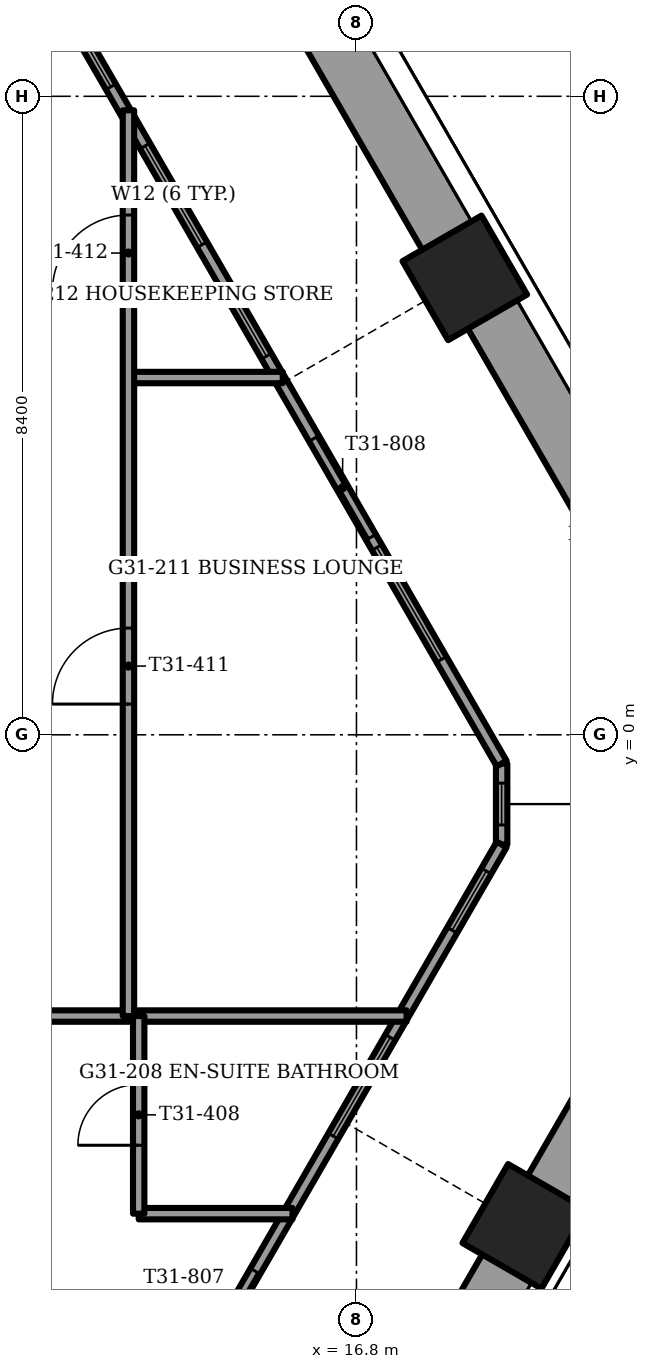
"""IFC4 building model, lengths in metres.
Left out: names, types, materials, properties, quantities, classifications, styles, units other than length and angle.
Written with IfcOpenShell. Run it as: python <this file> out.ifc"""

import sys

from ifc_helpers import new_model, si_unit, direction, frame, frame_2d, origin, origin_2d, place, context, subcontext, project, spatial, rectangle, extrude, element, fill, save


model = new_model("IFC4")
c1 = context("Model", 3, precision=1e-05, world=origin(), true_north=direction((0.0, 1.0)))
c2 = subcontext(c1, "Body", "Model", "MODEL_VIEW")
j1 = project(units=[si_unit("LENGTHUNIT", "METRE"), si_unit("PLANEANGLEUNIT", "RADIAN")], contexts=[c1])
p1 = place(None, origin())
s1 = spatial("IfcSite", under=j1, at=p1, CompositionType="ELEMENT")
p2 = place(p1, origin())
s2 = spatial("IfcBuilding", under=s1, at=p2, CompositionType="ELEMENT")
p3 = place(p2, frame((0.0, 0.0, 127.25)))
s3 = spatial("IfcBuildingStorey", under=s2, at=p3, CompositionType="ELEMENT", Elevation=127.25)
for number, where, z_axis, x_axis in (
    (1, (19.014, -6.467, -1.2), (0.0, 0.0, 1.0), (-0.5, -0.866, 0.0)),
    (2, (18.225, 6.011, -1.2), (0.0, 0.0, 1.0), (0.5, -0.866, 0.0)),
):
    element("IfcColumn", number, at=place(p3, frame(where, z_axis=z_axis, x_axis=x_axis)), inside=s3, PredefinedType="COLUMN", context=c2, shape_type="SweptSolid", body=[
        extrude(rectangle(XDim=1.2, YDim=1.2, at=origin_2d()), origin(), (0.0, 0.0, 1.0), 3.75),
    ])
p4 = place(p3, frame((15.522, -12.815, 0.0), z_axis=(0.0, 0.0, 1.0), x_axis=(0.499999023957, 0.866025967302, 0.0)))
e3 = element("IfcWall", 3, at=p4, inside=s3, PredefinedType="PARAPET", context=c2, shape_type="SweptSolid", body=[
    extrude(rectangle(XDim=6.673, YDim=0.9, at=frame_2d((3.337, 0.0))), origin(), (0.0, 0.0, 1.0), 1.1),
])
p5 = place(p3, frame((19.429, -6.048, 0.0), z_axis=(0.0, 0.0, 1.0), x_axis=(0.499982573574, 0.866035464703, 0.0)))
e4 = element("IfcWall", 4, at=p5, inside=s3, PredefinedType="PARAPET", context=c2, shape_type="SweptSolid", body=[
    extrude(rectangle(XDim=5.281, YDim=0.9, at=frame_2d((2.641, 0.0))), origin(), (0.0, 0.0, 1.0), 1.1),
])
p6 = place(p3, frame((22.069, -0.347, 0.0), z_axis=(0.0, 0.0, 1.0), x_axis=(-0.500001814021, 0.866024356456, 0.0)))
e5 = element("IfcWall", 5, at=p6, inside=s3, PredefinedType="PARAPET", context=c2, shape_type="SweptSolid", body=[
    extrude(rectangle(XDim=6.859, YDim=0.9, at=frame_2d((3.429, 0.0))), origin(), (0.0, 0.0, 1.0), 1.1),
])
p7 = place(p3, frame((18.07, 6.58, 0.0), z_axis=(0.0, 0.0, 1.0), x_axis=(-0.499999023957, 0.866025967302, 0.0)))
e6 = element("IfcWall", 6, at=p7, inside=s3, PredefinedType="PARAPET", context=c2, shape_type="SweptSolid", body=[
    extrude(rectangle(XDim=6.673, YDim=0.9, at=frame_2d((3.337, 0.0))), origin(), (0.0, 0.0, 1.0), 1.1),
])
p8 = place(p3, frame((10.605, -15.481, 0.0), z_axis=(0.0, 0.0, 1.0), x_axis=(0.500010582961, 0.866019293623, 0.0)))
e7 = element("IfcWall", 7, at=p8, inside=s3, PredefinedType="SOLIDWALL", context=c2, shape_type="SweptSolid", body=[
    extrude(rectangle(XDim=16.21, YDim=0.15, at=frame_2d((8.105, 0.0))), origin(), (0.0, 0.0, 1.0), 3.45),
])
p9 = place(p8, frame((2.105, 0.0, 0.15)))
e8 = element("IfcOpeningElement", 8, at=p9, cuts=e7, PredefinedType="OPENING", context=c2, shape_type="SweptSolid", body=[
    extrude(rectangle(XDim=1.7, YDim=2.85, at=frame_2d((0.85, 1.425))), frame((0.0, 0.075, 0.0), z_axis=(0.0, -1.0, 0.0), x_axis=(1.0, 0.0, 0.0)), (0.0, 0.0, 1.0), 0.15),
])
p10 = place(p8, frame((4.205, 0.0, 0.0)))
e9 = element("IfcOpeningElement", 9, at=p10, cuts=e7, PredefinedType="OPENING", context=c2, shape_type="SweptSolid", body=[
    extrude(rectangle(XDim=1.5, YDim=2.4, at=frame_2d((0.75, 1.2))), frame((0.0, 0.075, 0.0), z_axis=(0.0, -1.0, 0.0), x_axis=(1.0, 0.0, 0.0)), (0.0, 0.0, 1.0), 0.15),
])
p11 = place(p8, frame((6.305, 0.0, 0.15)))
e10 = element("IfcOpeningElement", 10, at=p11, cuts=e7, PredefinedType="OPENING", context=c2, shape_type="SweptSolid", body=[
    extrude(rectangle(XDim=1.7, YDim=2.85, at=frame_2d((0.85, 1.425))), frame((0.0, 0.075, 0.0), z_axis=(0.0, -1.0, 0.0), x_axis=(1.0, 0.0, 0.0)), (0.0, 0.0, 1.0), 0.15),
])
p12 = place(p8, frame((8.228, 0.0, 0.0)))
e11 = element("IfcOpeningElement", 11, at=p12, cuts=e7, PredefinedType="OPENING", context=c2, shape_type="SweptSolid", body=[
    extrude(rectangle(XDim=1.5, YDim=2.4, at=frame_2d((0.75, 1.2))), frame((0.0, 0.075, 0.0), z_axis=(0.0, -1.0, 0.0), x_axis=(1.0, 0.0, 0.0)), (0.0, 0.0, 1.0), 0.15),
])
p13 = place(p8, frame((11.78, 0.0, 0.15)))
e12 = element("IfcOpeningElement", 12, at=p13, cuts=e7, PredefinedType="OPENING", context=c2, shape_type="SweptSolid", body=[
    extrude(rectangle(XDim=1.5, YDim=2.85, at=frame_2d((0.75, 1.425))), frame((0.0, 0.075, 0.0), z_axis=(0.0, -1.0, 0.0), x_axis=(1.0, 0.0, 0.0)), (0.0, 0.0, 1.0), 0.15),
])
p14 = place(p8, frame((0.402, 0.0, 0.15)))
e13 = element("IfcOpeningElement", 13, at=p14, cuts=e7, PredefinedType="OPENING", context=c2, shape_type="SweptSolid", body=[
    extrude(rectangle(XDim=0.9, YDim=2.73, at=frame_2d((0.45, 1.365))), frame((0.0, 0.075, 0.0), z_axis=(0.0, -1.0, 0.0), x_axis=(1.0, 0.0, 0.0)), (0.0, 0.0, 1.0), 0.15),
])
p15 = place(p8, frame((14.907, 0.0, 0.15)))
e14 = element("IfcOpeningElement", 14, at=p15, cuts=e7, PredefinedType="OPENING", context=c2, shape_type="SweptSolid", body=[
    extrude(rectangle(XDim=0.9, YDim=2.73, at=frame_2d((0.45, 1.365))), frame((0.0, 0.075, 0.0), z_axis=(0.0, -1.0, 0.0), x_axis=(1.0, 0.0, 0.0)), (0.0, 0.0, 1.0), 0.15),
])
p16 = place(p3, frame((18.71, -0.378, 0.0), z_axis=(0.0, 0.0, 1.0), x_axis=(-0.500001219746, 0.866024699562, 0.0)))
e15 = element("IfcWall", 15, at=p16, inside=s3, PredefinedType="SOLIDWALL", context=c2, shape_type="SweptSolid", body=[
    extrude(rectangle(XDim=22.137, YDim=0.15, at=frame_2d((11.068, 0.0))), origin(), (0.0, 0.0, 1.0), 3.45),
])
p17 = place(p16, frame((1.583, 0.0, 0.15)))
e16 = element("IfcOpeningElement", 16, at=p17, cuts=e15, PredefinedType="OPENING", context=c2, shape_type="SweptSolid", body=[
    extrude(rectangle(XDim=1.7, YDim=2.85, at=frame_2d((0.85, 1.425))), frame((0.0, 0.075, 0.0), z_axis=(0.0, -1.0, 0.0), x_axis=(1.0, 0.0, 0.0)), (0.0, 0.0, 1.0), 0.15),
])
p18 = place(p16, frame((3.438, 0.0, 0.0)))
e17 = element("IfcOpeningElement", 17, at=p18, cuts=e15, PredefinedType="OPENING", context=c2, shape_type="SweptSolid", body=[
    extrude(rectangle(XDim=1.5, YDim=2.4, at=frame_2d((0.75, 1.2))), frame((0.0, 0.075, 0.0), z_axis=(0.0, -1.0, 0.0), x_axis=(1.0, 0.0, 0.0)), (0.0, 0.0, 1.0), 0.15),
])
p19 = place(p16, frame((6.188, 0.0, 0.15)))
e18 = element("IfcOpeningElement", 18, at=p19, cuts=e15, PredefinedType="OPENING", context=c2, shape_type="SweptSolid", body=[
    extrude(rectangle(XDim=0.9, YDim=2.85, at=frame_2d((0.45, 1.425))), frame((0.0, 0.075, 0.0), z_axis=(0.0, -1.0, 0.0), x_axis=(1.0, 0.0, 0.0)), (0.0, 0.0, 1.0), 0.15),
])
p20 = place(p16, frame((7.883, 0.0, 0.15)))
e19 = element("IfcOpeningElement", 19, at=p20, cuts=e15, PredefinedType="OPENING", context=c2, shape_type="SweptSolid", body=[
    extrude(rectangle(XDim=1.5, YDim=2.85, at=frame_2d((0.75, 1.425))), frame((0.0, 0.075, 0.0), z_axis=(0.0, -1.0, 0.0), x_axis=(1.0, 0.0, 0.0)), (0.0, 0.0, 1.0), 0.15),
])
p21 = place(p16, frame((12.481, 0.0, 0.15)))
e20 = element("IfcOpeningElement", 20, at=p21, cuts=e15, PredefinedType="OPENING", context=c2, shape_type="SweptSolid", body=[
    extrude(rectangle(XDim=0.9, YDim=2.85, at=frame_2d((0.45, 1.425))), frame((0.0, 0.075, 0.0), z_axis=(0.0, -1.0, 0.0), x_axis=(1.0, 0.0, 0.0)), (0.0, 0.0, 1.0), 0.15),
])
p22 = place(p16, frame((10.281, 0.0, 0.15)))
e21 = element("IfcOpeningElement", 21, at=p22, cuts=e15, PredefinedType="OPENING", context=c2, shape_type="SweptSolid", body=[
    extrude(rectangle(XDim=1.5, YDim=2.85, at=frame_2d((0.75, 1.425))), frame((0.0, 0.075, 0.0), z_axis=(0.0, -1.0, 0.0), x_axis=(1.0, 0.0, 0.0)), (0.0, 0.0, 1.0), 0.15),
])
p23 = place(p16, frame((16.465, 0.0, 0.15)))
e22 = element("IfcOpeningElement", 22, at=p23, cuts=e15, PredefinedType="OPENING", context=c2, shape_type="SweptSolid", body=[
    extrude(rectangle(XDim=0.9, YDim=2.85, at=frame_2d((0.45, 1.425))), frame((0.0, 0.075, 0.0), z_axis=(0.0, -1.0, 0.0), x_axis=(1.0, 0.0, 0.0)), (0.0, 0.0, 1.0), 0.15),
])
p24 = place(p16, frame((14.265, 0.0, 0.15)))
e23 = element("IfcOpeningElement", 23, at=p24, cuts=e15, PredefinedType="OPENING", context=c2, shape_type="SweptSolid", body=[
    extrude(rectangle(XDim=1.5, YDim=2.85, at=frame_2d((0.75, 1.425))), frame((0.0, 0.075, 0.0), z_axis=(0.0, -1.0, 0.0), x_axis=(1.0, 0.0, 0.0)), (0.0, 0.0, 1.0), 0.15),
])
p25 = place(p16, frame((19.415, 0.0, 0.15)))
e24 = element("IfcOpeningElement", 24, at=p25, cuts=e15, PredefinedType="OPENING", context=c2, shape_type="SweptSolid", body=[
    extrude(rectangle(XDim=1.7, YDim=2.73, at=frame_2d((0.85, 1.365))), frame((0.0, 0.075, 0.0), z_axis=(0.0, -1.0, 0.0), x_axis=(1.0, 0.0, 0.0)), (0.0, 0.0, 1.0), 0.15),
])
p26 = place(p3, frame((18.71, -1.444, 0.0), z_axis=(0.0, 0.0, 1.0), x_axis=(0.0, 1.0, 0.0)))
e25 = element("IfcWall", 25, at=p26, inside=s3, PredefinedType="SOLIDWALL", context=c2, shape_type="SweptSolid", body=[
    extrude(rectangle(XDim=1.065, YDim=0.15, at=frame_2d((0.533, 0.0))), origin(), (0.0, 0.0, 1.0), 3.45),
])
p27 = place(p26, frame((0.258, 0.0, 0.15)))
e26 = element("IfcOpeningElement", 26, at=p27, cuts=e25, PredefinedType="OPENING", context=c2, shape_type="SweptSolid", body=[
    extrude(rectangle(XDim=0.55, YDim=2.85, at=frame_2d((0.275, 1.425))), frame((0.0, 0.075, 0.0), z_axis=(0.0, -1.0, 0.0), x_axis=(1.0, 0.0, 0.0)), (0.0, 0.0, 1.0), 0.15),
])
p28 = place(p3, frame((13.935, -6.3, 0.0), z_axis=(0.0, 0.0, 1.0), x_axis=(1.0, 0.0, 0.0)))
e27 = element("IfcWall", 27, at=p28, inside=s3, PredefinedType="PARTITIONING", context=c2, shape_type="SweptSolid", body=[
    extrude(rectangle(XDim=2.023, YDim=0.15, at=frame_2d((1.011, 0.0))), origin(), (0.0, 0.0, 1.0), 3.45),
])
p29 = place(p3, frame((9.16, -3.7, 0.0), z_axis=(0.0, 0.0, 1.0), x_axis=(1.0, 0.0, 0.0)))
e28 = element("IfcWall", 28, at=p29, inside=s3, PredefinedType="PARTITIONING", context=c2, shape_type="SweptSolid", body=[
    extrude(rectangle(XDim=8.299, YDim=0.15, at=frame_2d((4.149, 0.0))), origin(), (0.0, 0.0, 1.0), 3.45),
])
p30 = place(p29, frame((0.24, 0.0, 0.0)))
e29 = element("IfcOpeningElement", 29, at=p30, cuts=e28, PredefinedType="OPENING", context=c2, shape_type="SweptSolid", body=[
    extrude(rectangle(XDim=1.0, YDim=2.1, at=frame_2d((0.5, 1.05))), frame((0.0, 0.075, 0.0), z_axis=(0.0, -1.0, 0.0), x_axis=(1.0, 0.0, 0.0)), (0.0, 0.0, 1.0), 0.15),
])
p31 = place(p3, frame((13.8, 4.7, 0.0), z_axis=(0.0, 0.0, 1.0), x_axis=(1.0, 0.0, 0.0)))
e30 = element("IfcWall", 30, at=p31, inside=s3, PredefinedType="PARTITIONING", context=c2, shape_type="SweptSolid", body=[
    extrude(rectangle(XDim=2.03, YDim=0.15, at=frame_2d((1.015, 0.0))), origin(), (0.0, 0.0, 1.0), 3.45),
])
p32 = place(p3, frame((13.935, -6.3, 0.0), z_axis=(0.0, 0.0, 1.0), x_axis=(0.0, 1.0, 0.0)))
e31 = element("IfcWall", 31, at=p32, inside=s3, PredefinedType="PARTITIONING", context=c2, shape_type="SweptSolid", body=[
    extrude(rectangle(XDim=2.6, YDim=0.15, at=frame_2d((1.3, 0.0))), origin(), (0.0, 0.0, 1.0), 3.45),
])
p33 = place(p32, frame((0.9, 0.0, 0.0)))
e32 = element("IfcOpeningElement", 32, at=p33, cuts=e31, PredefinedType="OPENING", context=c2, shape_type="SweptSolid", body=[
    extrude(rectangle(XDim=0.8, YDim=2.1, at=frame_2d((0.4, 1.05))), frame((0.0, 0.075, 0.0), z_axis=(0.0, -1.0, 0.0), x_axis=(1.0, 0.0, 0.0)), (0.0, 0.0, 1.0), 0.15),
])
p34 = place(p3, frame((13.8, -3.7, 0.0), z_axis=(0.0, 0.0, 1.0), x_axis=(0.0, 1.0, 0.0)))
e33 = element("IfcWall", 33, at=p34, inside=s3, PredefinedType="PARTITIONING", context=c2, shape_type="SweptSolid", body=[
    extrude(rectangle(XDim=11.916, YDim=0.15, at=frame_2d((5.958, 0.0))), origin(), (0.0, 0.0, 1.0), 3.45),
])
p35 = place(p34, frame((4.104, 0.0, 0.0)))
e34 = element("IfcOpeningElement", 34, at=p35, cuts=e33, PredefinedType="OPENING", context=c2, shape_type="SweptSolid", body=[
    extrude(rectangle(XDim=1.0, YDim=2.1, at=frame_2d((0.5, 1.05))), frame((0.0, 0.075, 0.0), z_axis=(0.0, -1.0, 0.0), x_axis=(1.0, 0.0, 0.0)), (0.0, 0.0, 1.0), 0.15),
])
p36 = place(p34, frame((9.538, 0.0, 0.0)))
e35 = element("IfcOpeningElement", 35, at=p36, cuts=e33, PredefinedType="OPENING", context=c2, shape_type="SweptSolid", body=[
    extrude(rectangle(XDim=1.0, YDim=2.1, at=frame_2d((0.5, 1.05))), frame((0.0, 0.075, 0.0), z_axis=(0.0, -1.0, 0.0), x_axis=(1.0, 0.0, 0.0)), (0.0, 0.0, 1.0), 0.15),
])
p37 = place(p12, origin())
e36 = element("IfcDoor", 36, at=p37, inside=s3, OperationType="SLIDING_TO_RIGHT", PredefinedType="DOOR", context=c2, shape_type="SweptSolid", body=[
    extrude(rectangle(XDim=1.5, YDim=2.4, at=frame_2d((0.75, 1.2))), frame((0.0, 0.025, 0.0), z_axis=(0.0, -1.0, 0.0), x_axis=(1.0, 0.0, 0.0)), (0.0, 0.0, 1.0), 0.05),
])
fill(e11, e36)
p38 = place(p13, origin())
e37 = element("IfcWindow", 37, at=p38, inside=s3, PartitioningType="SINGLE_PANEL", PredefinedType="WINDOW", context=c2, shape_type="SweptSolid", body=[
    extrude(rectangle(XDim=1.5, YDim=2.85, at=frame_2d((0.75, 1.425))), frame((0.0, 0.03, 0.0), z_axis=(0.0, -1.0, 0.0), x_axis=(1.0, 0.0, 0.0)), (0.0, 0.0, 1.0), 0.06),
])
fill(e12, e37)
p39 = place(p15, origin())
e38 = element("IfcWindow", 38, at=p39, inside=s3, PartitioningType="SINGLE_PANEL", PredefinedType="WINDOW", context=c2, shape_type="SweptSolid", body=[
    extrude(rectangle(XDim=0.9, YDim=2.73, at=frame_2d((0.45, 1.365))), frame((0.0, 0.03, 0.0), z_axis=(0.0, -1.0, 0.0), x_axis=(1.0, 0.0, 0.0)), (0.0, 0.0, 1.0), 0.06),
])
fill(e14, e38)
p40 = place(p17, origin())
e39 = element("IfcWindow", 39, at=p40, inside=s3, PartitioningType="SINGLE_PANEL", PredefinedType="WINDOW", context=c2, shape_type="SweptSolid", body=[
    extrude(rectangle(XDim=1.7, YDim=2.85, at=frame_2d((0.85, 1.425))), frame((0.0, 0.03, 0.0), z_axis=(0.0, -1.0, 0.0), x_axis=(1.0, 0.0, 0.0)), (0.0, 0.0, 1.0), 0.06),
])
fill(e16, e39)
p41 = place(p18, origin())
e40 = element("IfcDoor", 40, at=p41, inside=s3, OperationType="SLIDING_TO_LEFT", PredefinedType="DOOR", context=c2, shape_type="SweptSolid", body=[
    extrude(rectangle(XDim=1.5, YDim=2.4, at=frame_2d((0.75, 1.2))), frame((0.0, 0.025, 0.0), z_axis=(0.0, -1.0, 0.0), x_axis=(1.0, 0.0, 0.0)), (0.0, 0.0, 1.0), 0.05),
])
fill(e17, e40)
p42 = place(p19, origin())
e41 = element("IfcWindow", 41, at=p42, inside=s3, PartitioningType="SINGLE_PANEL", PredefinedType="WINDOW", context=c2, shape_type="SweptSolid", body=[
    extrude(rectangle(XDim=0.9, YDim=2.85, at=frame_2d((0.45, 1.425))), frame((0.0, 0.03, 0.0), z_axis=(0.0, -1.0, 0.0), x_axis=(1.0, 0.0, 0.0)), (0.0, 0.0, 1.0), 0.06),
])
fill(e18, e41)
p43 = place(p20, origin())
e42 = element("IfcWindow", 42, at=p43, inside=s3, PartitioningType="SINGLE_PANEL", PredefinedType="WINDOW", context=c2, shape_type="SweptSolid", body=[
    extrude(rectangle(XDim=1.5, YDim=2.85, at=frame_2d((0.75, 1.425))), frame((0.0, 0.03, 0.0), z_axis=(0.0, -1.0, 0.0), x_axis=(1.0, 0.0, 0.0)), (0.0, 0.0, 1.0), 0.06),
])
fill(e19, e42)
p44 = place(p22, origin())
e43 = element("IfcWindow", 43, at=p44, inside=s3, PartitioningType="SINGLE_PANEL", PredefinedType="WINDOW", context=c2, shape_type="SweptSolid", body=[
    extrude(rectangle(XDim=1.5, YDim=2.85, at=frame_2d((0.75, 1.425))), frame((0.0, 0.03, 0.0), z_axis=(0.0, -1.0, 0.0), x_axis=(1.0, 0.0, 0.0)), (0.0, 0.0, 1.0), 0.06),
])
fill(e21, e43)
p45 = place(p27, origin())
e44 = element("IfcWindow", 44, at=p45, inside=s3, PartitioningType="SINGLE_PANEL", PredefinedType="WINDOW", context=c2, shape_type="SweptSolid", body=[
    extrude(rectangle(XDim=0.55, YDim=2.85, at=frame_2d((0.275, 1.425))), frame((0.0, 0.03, 0.0), z_axis=(0.0, -1.0, 0.0), x_axis=(1.0, 0.0, 0.0)), (0.0, 0.0, 1.0), 0.06),
])
fill(e26, e44)
p46 = place(p33, origin())
e45 = element("IfcDoor", 45, at=p46, inside=s3, OperationType="SINGLE_SWING_RIGHT", PredefinedType="DOOR", context=c2, shape_type="SweptSolid", body=[
    extrude(rectangle(XDim=0.8, YDim=2.1, at=frame_2d((0.4, 1.05))), frame((0.0, 0.025, 0.0), z_axis=(0.0, -1.0, 0.0), x_axis=(1.0, 0.0, 0.0)), (0.0, 0.0, 1.0), 0.05),
])
fill(e32, e45)
p47 = place(p35, origin())
e46 = element("IfcDoor", 46, at=p47, inside=s3, OperationType="SINGLE_SWING_RIGHT", PredefinedType="DOOR", context=c2, shape_type="SweptSolid", body=[
    extrude(rectangle(XDim=1.0, YDim=2.1, at=frame_2d((0.5, 1.05))), frame((0.0, 0.025, 0.0), z_axis=(0.0, -1.0, 0.0), x_axis=(1.0, 0.0, 0.0)), (0.0, 0.0, 1.0), 0.05),
])
fill(e34, e46)
p48 = place(p36, origin())
e47 = element("IfcDoor", 47, at=p48, inside=s3, OperationType="SINGLE_SWING_LEFT", PredefinedType="DOOR", context=c2, shape_type="SweptSolid", body=[
    extrude(rectangle(XDim=1.0, YDim=2.1, at=frame_2d((0.5, 1.05))), frame((0.0, 0.025, 0.0), z_axis=(0.0, -1.0, 0.0), x_axis=(1.0, 0.0, 0.0)), (0.0, 0.0, 1.0), 0.05),
])
fill(e35, e47)
save(model, sys.argv[1])
